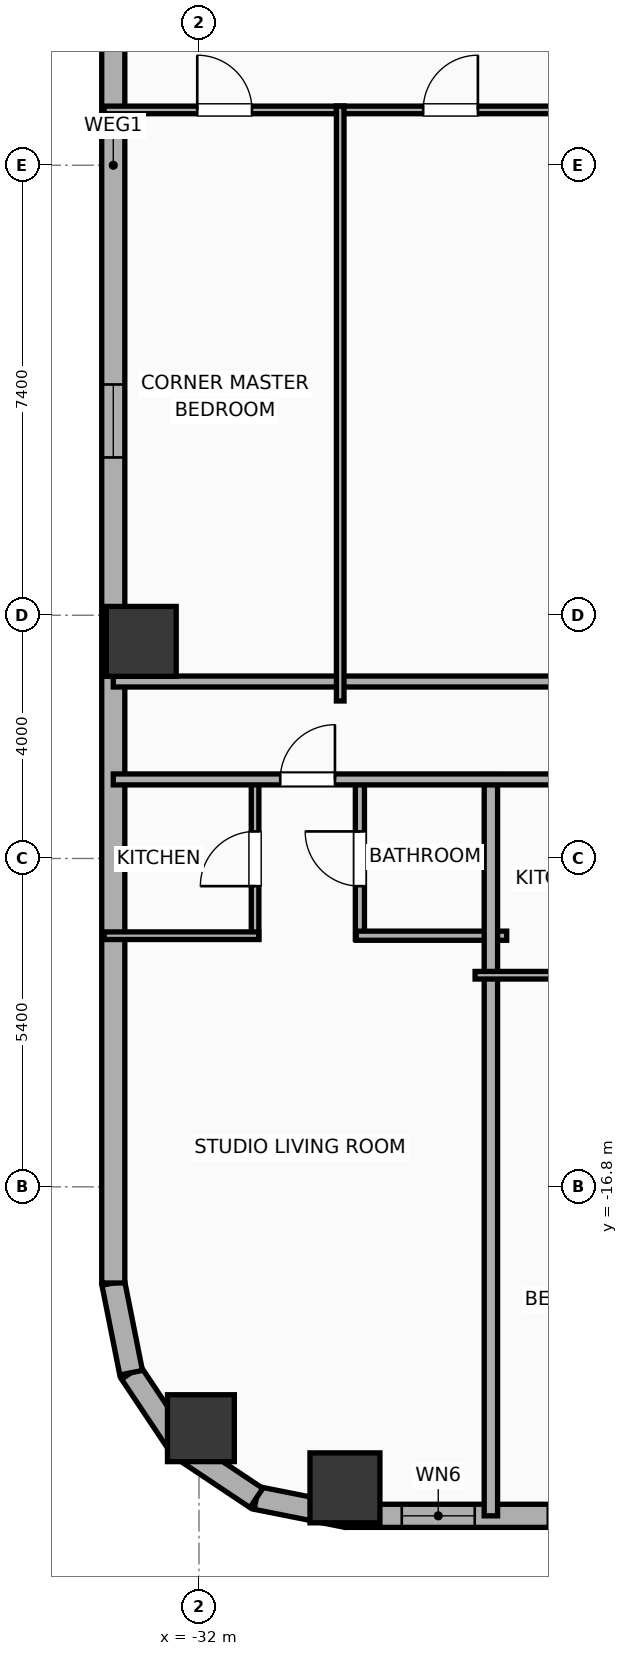
"""IFC4 building model, lengths in metres.
Left out: names, types, materials, properties, quantities, classifications, styles, units other than length and angle.
Written with IfcOpenShell. Run it as: python <this file> out.ifc"""

import sys

from ifc_helpers import new_model, si_unit, direction, frame, frame_2d, origin, origin_2d, place, context, subcontext, project, spatial, rectangle, hollow_rectangle, hollow_circle, extrude, element, fill, save


model = new_model("IFC4")
c1 = context("Model", 3, precision=1e-05, world=origin(), true_north=direction((0.0, 1.0)))
c2 = subcontext(c1, "Body", "Model", "MODEL_VIEW")
j1 = project(units=[si_unit("LENGTHUNIT", "METRE"), si_unit("PLANEANGLEUNIT", "RADIAN")], contexts=[c1])
p1 = place(None, origin())
s1 = spatial("IfcSite", under=j1, at=p1, CompositionType="ELEMENT")
p2 = place(p1, origin())
s2 = spatial("IfcBuilding", under=s1, at=p2, CompositionType="ELEMENT")
p3 = place(p2, frame((0.0, 0.0, 41.6)))
s3 = spatial("IfcBuildingStorey", under=s2, at=p3, CompositionType="ELEMENT", Elevation=41.6)
for number, where, z_axis, x_axis in (
    (1, (-29.6, -21.75, 0.0), (0.0, 0.0, 1.0), (1.0, 0.0, 0.0)),
    (2, (-32.95, -7.83, 0.0), (0.0, 0.0, 1.0), (1.0, 0.0, 0.0)),
):
    element("IfcColumn", number, at=place(p3, frame(where, z_axis=z_axis, x_axis=x_axis)), inside=s3, PredefinedType="COLUMN", context=c2, shape_type="SweptSolid", body=[
        extrude(hollow_rectangle(XDim=1.15, YDim=1.15, WallThickness=0.04, at=origin_2d()), origin(), (0.0, 0.0, 1.0), 3.9),
    ])
p4 = place(p3, frame((-31.969, -20.769, 0.0), z_axis=(0.0, 0.0, 1.0), x_axis=(1.0, 0.0, 0.0)))
e3 = element("IfcColumn", 3, at=p4, inside=s3, PredefinedType="COLUMN", context=c2, shape_type="SweptSolid", body=[
    extrude(hollow_circle(Radius=0.55, WallThickness=0.036, at=origin_2d()), origin(), (0.0, 0.0, 1.0), 3.9),
])
p5 = place(p3, frame((22.381, -22.21, 0.0), z_axis=(0.0, 0.0, 1.0), x_axis=(-1.0, 0.0, 0.0)))
e4 = element("IfcWall", 4, at=p5, inside=s3, PredefinedType="ELEMENTEDWALL", context=c2, shape_type="SweptSolid", body=[
    extrude(rectangle(XDim=51.963, YDim=0.38, at=frame_2d((25.981, 0.0))), origin(), (0.0, 0.0, 1.0), 3.65),
])
p6 = place(p5, frame((42.952, 0.0, 0.75)))
e5 = element("IfcOpeningElement", 5, at=p6, cuts=e4, PredefinedType="OPENING", context=c2, shape_type="SweptSolid", body=[
    extrude(rectangle(XDim=2.4, YDim=2.1, at=frame_2d((1.2, 1.05))), frame((0.0, 0.2, 0.0), z_axis=(0.0, -1.0, 0.0), x_axis=(1.0, 0.0, 0.0)), (0.0, 0.0, 1.0), 0.4),
])
p7 = place(p5, frame((49.847, 0.0, 0.75)))
e6 = element("IfcOpeningElement", 6, at=p7, cuts=e4, PredefinedType="OPENING", context=c2, shape_type="SweptSolid", body=[
    extrude(rectangle(XDim=1.2, YDim=2.05, at=frame_2d((0.6, 1.025))), frame((0.0, 0.2, 0.0), z_axis=(0.0, -1.0, 0.0), x_axis=(1.0, 0.0, 0.0)), (0.0, 0.0, 1.0), 0.4),
])
p8 = place(p5, frame((47.445, 0.0, 0.75)))
e7 = element("IfcOpeningElement", 7, at=p8, cuts=e4, PredefinedType="OPENING", context=c2, shape_type="SweptSolid", body=[
    extrude(rectangle(XDim=1.2, YDim=2.05, at=frame_2d((0.6, 1.025))), frame((0.0, 0.2, 0.0), z_axis=(0.0, -1.0, 0.0), x_axis=(1.0, 0.0, 0.0)), (0.0, 0.0, 1.0), 0.4),
])
p9 = place(p5, frame((39.526, 0.0, 0.75)))
e8 = element("IfcOpeningElement", 8, at=p9, cuts=e4, PredefinedType="OPENING", context=c2, shape_type="SweptSolid", body=[
    extrude(rectangle(XDim=1.2, YDim=2.05, at=frame_2d((0.6, 1.025))), frame((0.0, 0.2, 0.0), z_axis=(0.0, -1.0, 0.0), x_axis=(1.0, 0.0, 0.0)), (0.0, 0.0, 1.0), 0.4),
])
p10 = place(p5, frame((33.018, 0.0, 0.75)))
e9 = element("IfcOpeningElement", 9, at=p10, cuts=e4, PredefinedType="OPENING", context=c2, shape_type="SweptSolid", body=[
    extrude(rectangle(XDim=1.2, YDim=2.05, at=frame_2d((0.6, 1.025))), frame((0.0, 0.2, 0.0), z_axis=(0.0, -1.0, 0.0), x_axis=(1.0, 0.0, 0.0)), (0.0, 0.0, 1.0), 0.4),
])
p11 = place(p5, frame((36.813, 0.0, 0.75)))
e10 = element("IfcOpeningElement", 10, at=p11, cuts=e4, PredefinedType="OPENING", context=c2, shape_type="SweptSolid", body=[
    extrude(rectangle(XDim=1.2, YDim=2.05, at=frame_2d((0.6, 1.025))), frame((0.0, 0.2, 0.0), z_axis=(0.0, -1.0, 0.0), x_axis=(1.0, 0.0, 0.0)), (0.0, 0.0, 1.0), 0.4),
])
p12 = place(p5, frame((28.886, 0.0, 0.75)))
e11 = element("IfcOpeningElement", 11, at=p12, cuts=e4, PredefinedType="OPENING", context=c2, shape_type="SweptSolid", body=[
    extrude(rectangle(XDim=1.2, YDim=2.05, at=frame_2d((0.6, 1.025))), frame((0.0, 0.2, 0.0), z_axis=(0.0, -1.0, 0.0), x_axis=(1.0, 0.0, 0.0)), (0.0, 0.0, 1.0), 0.4),
])
p13 = place(p5, frame((23.306, 0.0, 0.75)))
e12 = element("IfcOpeningElement", 12, at=p13, cuts=e4, PredefinedType="OPENING", context=c2, shape_type="SweptSolid", body=[
    extrude(rectangle(XDim=1.2, YDim=2.05, at=frame_2d((0.6, 1.025))), frame((0.0, 0.2, 0.0), z_axis=(0.0, -1.0, 0.0), x_axis=(1.0, 0.0, 0.0)), (0.0, 0.0, 1.0), 0.4),
])
p14 = place(p5, frame((26.056, 0.0, 0.75)))
e13 = element("IfcOpeningElement", 13, at=p14, cuts=e4, PredefinedType="OPENING", context=c2, shape_type="SweptSolid", body=[
    extrude(rectangle(XDim=1.2, YDim=2.05, at=frame_2d((0.6, 1.025))), frame((0.0, 0.2, 0.0), z_axis=(0.0, -1.0, 0.0), x_axis=(1.0, 0.0, 0.0)), (0.0, 0.0, 1.0), 0.4),
])
p15 = place(p5, frame((18.811, 0.0, 0.75)))
e14 = element("IfcOpeningElement", 14, at=p15, cuts=e4, PredefinedType="OPENING", context=c2, shape_type="SweptSolid", body=[
    extrude(rectangle(XDim=1.2, YDim=2.05, at=frame_2d((0.6, 1.025))), frame((0.0, 0.2, 0.0), z_axis=(0.0, -1.0, 0.0), x_axis=(1.0, 0.0, 0.0)), (0.0, 0.0, 1.0), 0.4),
])
p16 = place(p5, frame((14.602, 0.0, 0.75)))
e15 = element("IfcOpeningElement", 15, at=p16, cuts=e4, PredefinedType="OPENING", context=c2, shape_type="SweptSolid", body=[
    extrude(rectangle(XDim=1.2, YDim=2.05, at=frame_2d((0.6, 1.025))), frame((0.0, 0.2, 0.0), z_axis=(0.0, -1.0, 0.0), x_axis=(1.0, 0.0, 0.0)), (0.0, 0.0, 1.0), 0.4),
])
p17 = place(p5, frame((11.852, 0.0, 0.75)))
e16 = element("IfcOpeningElement", 16, at=p17, cuts=e4, PredefinedType="OPENING", context=c2, shape_type="SweptSolid", body=[
    extrude(rectangle(XDim=1.2, YDim=2.05, at=frame_2d((0.6, 1.025))), frame((0.0, 0.2, 0.0), z_axis=(0.0, -1.0, 0.0), x_axis=(1.0, 0.0, 0.0)), (0.0, 0.0, 1.0), 0.4),
])
p18 = place(p5, frame((8.316, 0.0, 0.75)))
e17 = element("IfcOpeningElement", 17, at=p18, cuts=e4, PredefinedType="OPENING", context=c2, shape_type="SweptSolid", body=[
    extrude(rectangle(XDim=1.2, YDim=2.05, at=frame_2d((0.6, 1.025))), frame((0.0, 0.2, 0.0), z_axis=(0.0, -1.0, 0.0), x_axis=(1.0, 0.0, 0.0)), (0.0, 0.0, 1.0), 0.4),
])
p19 = place(p5, frame((6.286, 0.0, 0.75)))
e18 = element("IfcOpeningElement", 18, at=p19, cuts=e4, PredefinedType="OPENING", context=c2, shape_type="SweptSolid", body=[
    extrude(rectangle(XDim=1.2, YDim=2.05, at=frame_2d((0.6, 1.025))), frame((0.0, 0.2, 0.0), z_axis=(0.0, -1.0, 0.0), x_axis=(1.0, 0.0, 0.0)), (0.0, 0.0, 1.0), 0.4),
])
p20 = place(p5, frame((3.737, 0.0, 0.75)))
e19 = element("IfcOpeningElement", 19, at=p20, cuts=e4, PredefinedType="OPENING", context=c2, shape_type="SweptSolid", body=[
    extrude(rectangle(XDim=1.2, YDim=2.05, at=frame_2d((0.6, 1.025))), frame((0.0, 0.2, 0.0), z_axis=(0.0, -1.0, 0.0), x_axis=(1.0, 0.0, 0.0)), (0.0, 0.0, 1.0), 0.4),
])
p21 = place(p5, frame((1.291, 0.0, 0.75)))
e20 = element("IfcOpeningElement", 20, at=p21, cuts=e4, PredefinedType="OPENING", context=c2, shape_type="SweptSolid", body=[
    extrude(rectangle(XDim=1.2, YDim=2.05, at=frame_2d((0.6, 1.025))), frame((0.0, 0.2, 0.0), z_axis=(0.0, -1.0, 0.0), x_axis=(1.0, 0.0, 0.0)), (0.0, 0.0, 1.0), 0.4),
])
p22 = place(p3, frame((-29.581, -22.21, 0.0), z_axis=(0.0, 0.0, 1.0), x_axis=(-0.980786132421, 0.195086038585, 0.0)))
e21 = element("IfcWall", 21, at=p22, inside=s3, PredefinedType="ELEMENTEDWALL", context=c2, shape_type="SweptSolid", body=[
    extrude(rectangle(XDim=1.504, YDim=0.38, at=frame_2d((0.752, 0.0))), origin(), (0.0, 0.0, 1.0), 3.65),
])
p23 = place(p3, frame((-31.057, -21.917, 0.0), z_axis=(0.0, 0.0, 1.0), x_axis=(-0.831442848281, 0.555610286119, 0.0)))
e22 = element("IfcWall", 22, at=p23, inside=s3, PredefinedType="ELEMENTEDWALL", context=c2, shape_type="SweptSolid", body=[
    extrude(rectangle(XDim=1.485, YDim=0.38, at=frame_2d((0.743, 0.0))), origin(), (0.0, 0.0, 1.0), 3.65),
])
p24 = place(p3, frame((-32.292, -21.091, 0.0), z_axis=(0.0, 0.0, 1.0), x_axis=(-0.555572577804, 0.831468045563, 0.0)))
e23 = element("IfcWall", 23, at=p24, inside=s3, PredefinedType="ELEMENTEDWALL", context=c2, shape_type="SweptSolid", body=[
    extrude(rectangle(XDim=1.485, YDim=0.38, at=frame_2d((0.742, 0.0))), origin(), (0.0, 0.0, 1.0), 3.65),
])
p25 = place(p3, frame((-33.116, -19.857, 0.0), z_axis=(0.0, 0.0, 1.0), x_axis=(-0.195086038585, 0.980786132421, 0.0)))
e24 = element("IfcWall", 24, at=p25, inside=s3, PredefinedType="ELEMENTEDWALL", context=c2, shape_type="SweptSolid", body=[
    extrude(rectangle(XDim=1.504, YDim=0.38, at=frame_2d((0.752, 0.0))), origin(), (0.0, 0.0, 1.0), 3.65),
])
p26 = place(p3, frame((-33.41, -18.381, 0.0), z_axis=(0.0, 0.0, 1.0), x_axis=(0.0, 1.0, 0.0)))
e25 = element("IfcWall", 25, at=p26, inside=s3, PredefinedType="ELEMENTEDWALL", context=c2, shape_type="SweptSolid", body=[
    extrude(rectangle(XDim=36.763, YDim=0.38, at=frame_2d((18.381, 0.0))), origin(), (0.0, 0.0, 1.0), 3.65),
])
p27 = place(p26, frame((33.187, 0.0, 0.75)))
e26 = element("IfcOpeningElement", 26, at=p27, cuts=e25, PredefinedType="OPENING", context=c2, shape_type="SweptSolid", body=[
    extrude(rectangle(XDim=1.2, YDim=2.05, at=frame_2d((0.6, 1.025))), frame((0.0, 0.2, 0.0), z_axis=(0.0, -1.0, 0.0), x_axis=(1.0, 0.0, 0.0)), (0.0, 0.0, 1.0), 0.4),
])
p28 = place(p26, frame((22.126, 0.0, 0.75)))
e27 = element("IfcOpeningElement", 27, at=p28, cuts=e25, PredefinedType="OPENING", context=c2, shape_type="SweptSolid", body=[
    extrude(rectangle(XDim=1.2, YDim=2.05, at=frame_2d((0.6, 1.025))), frame((0.0, 0.2, 0.0), z_axis=(0.0, -1.0, 0.0), x_axis=(1.0, 0.0, 0.0)), (0.0, 0.0, 1.0), 0.4),
])
p29 = place(p26, frame((13.576, 0.0, 0.75)))
e28 = element("IfcOpeningElement", 28, at=p29, cuts=e25, PredefinedType="OPENING", context=c2, shape_type="SweptSolid", body=[
    extrude(rectangle(XDim=1.2, YDim=2.05, at=frame_2d((0.6, 1.025))), frame((0.0, 0.2, 0.0), z_axis=(0.0, -1.0, 0.0), x_axis=(1.0, 0.0, 0.0)), (0.0, 0.0, 1.0), 0.4),
])
p30 = place(p3, frame((-33.41, -8.49, 0.0), z_axis=(0.0, 0.0, 1.0), x_axis=(1.0, 0.0, 0.0)))
e29 = element("IfcWall", 29, at=p30, inside=s3, PredefinedType="PARTITIONING", context=c2, shape_type="SweptSolid", body=[
    extrude(rectangle(XDim=23.53, YDim=0.18, at=frame_2d((11.765, 0.0))), origin(), (0.0, 0.0, 1.0), 3.65),
])
p31 = place(p3, frame((-31.078, -12.73, 0.0), z_axis=(0.0, 0.0, 1.0), x_axis=(0.0, 1.0, 0.0)))
e30 = element("IfcWall", 30, at=p31, inside=s3, PredefinedType="PARTITIONING", context=c2, shape_type="SweptSolid", body=[
    extrude(rectangle(XDim=2.65, YDim=0.125, at=frame_2d((1.325, 0.0))), origin(), (0.0, 0.0, 1.0), 3.65),
])
p32 = place(p31, frame((0.875, 0.0, 0.0)))
e31 = element("IfcOpeningElement", 31, at=p32, cuts=e30, PredefinedType="OPENING", context=c2, shape_type="SweptSolid", body=[
    extrude(rectangle(XDim=0.9, YDim=2.05, at=frame_2d((0.45, 1.025))), frame((0.0, 0.073, 0.0), z_axis=(0.0, -1.0, 0.0), x_axis=(1.0, 0.0, 0.0)), (0.0, 0.0, 1.0), 0.145),
])
p33 = place(p3, frame((-29.354, -12.73, 0.0), z_axis=(0.0, 0.0, 1.0), x_axis=(0.0, 1.0, 0.0)))
e32 = element("IfcWall", 32, at=p33, inside=s3, PredefinedType="PLUMBINGWALL", context=c2, shape_type="SweptSolid", body=[
    extrude(rectangle(XDim=2.65, YDim=0.15, at=frame_2d((1.325, 0.0))), origin(), (0.0, 0.0, 1.0), 3.65),
])
p34 = place(p33, frame((0.875, 0.0, 0.0)))
e33 = element("IfcOpeningElement", 33, at=p34, cuts=e32, PredefinedType="OPENING", context=c2, shape_type="SweptSolid", body=[
    extrude(rectangle(XDim=0.9, YDim=2.05, at=frame_2d((0.45, 1.025))), frame((0.0, 0.085, 0.0), z_axis=(0.0, -1.0, 0.0), x_axis=(1.0, 0.0, 0.0)), (0.0, 0.0, 1.0), 0.17),
])
p35 = place(p3, frame((-33.56, -12.67, 0.0), z_axis=(0.0, 0.0, 1.0), x_axis=(1.0, 0.0, 0.0)))
e34 = element("IfcWall", 34, at=p35, inside=s3, PredefinedType="PARTITIONING", context=c2, shape_type="SweptSolid", body=[
    extrude(rectangle(XDim=2.542, YDim=0.125, at=frame_2d((1.271, 0.0))), origin(), (0.0, 0.0, 1.0), 3.65),
])
p36 = place(p3, frame((-29.414, -12.67, 0.0), z_axis=(0.0, 0.0, 1.0), x_axis=(1.0, 0.0, 0.0)))
e35 = element("IfcWall", 35, at=p36, inside=s3, PredefinedType="PLUMBINGWALL", context=c2, shape_type="SweptSolid", body=[
    extrude(rectangle(XDim=2.474, YDim=0.15, at=frame_2d((1.237, 0.0))), origin(), (0.0, 0.0, 1.0), 3.65),
])
p37 = place(p3, frame((-27.2, -22.21, 0.0), z_axis=(0.0, 0.0, 1.0), x_axis=(0.0, 1.0, 0.0)))
e36 = element("IfcWall", 36, at=p37, inside=s3, PredefinedType="PARTITIONING", context=c2, shape_type="SweptSolid", body=[
    extrude(rectangle(XDim=12.19, YDim=0.22, at=frame_2d((6.095, 0.0))), origin(), (0.0, 0.0, 1.0), 3.65),
])
p38 = place(p3, frame((-27.46, -13.32, 0.0), z_axis=(0.0, 0.0, 1.0), x_axis=(1.0, 0.0, 0.0)))
e37 = element("IfcWall", 37, at=p38, inside=s3, PredefinedType="PARTITIONING", context=c2, shape_type="SweptSolid", body=[
    extrude(rectangle(XDim=3.452, YDim=0.125, at=frame_2d((1.726, 0.0))), origin(), (0.0, 0.0, 1.0), 3.65),
])
p39 = place(p3, frame((-33.41, -10.1, 0.0), z_axis=(0.0, 0.0, 1.0), x_axis=(1.0, 0.0, 0.0)))
e38 = element("IfcWall", 38, at=p39, inside=s3, PredefinedType="PARTITIONING", context=c2, shape_type="SweptSolid", body=[
    extrude(rectangle(XDim=59.62, YDim=0.18, at=frame_2d((29.81, 0.0))), origin(), (0.0, 0.0, 1.0), 3.65),
])
p40 = place(p39, frame((2.746, 0.0, 0.0)))
e39 = element("IfcOpeningElement", 39, at=p40, cuts=e38, PredefinedType="OPENING", context=c2, shape_type="SweptSolid", body=[
    extrude(rectangle(XDim=0.9, YDim=2.05, at=frame_2d((0.45, 1.025))), frame((0.0, 0.1, 0.0), z_axis=(0.0, -1.0, 0.0), x_axis=(1.0, 0.0, 0.0)), (0.0, 0.0, 1.0), 0.2),
])
p41 = place(p39, frame((11.552, 0.0, 0.0)))
e40 = element("IfcOpeningElement", 40, at=p41, cuts=e38, PredefinedType="OPENING", context=c2, shape_type="SweptSolid", body=[
    extrude(rectangle(XDim=1.15, YDim=2.05, at=frame_2d((0.575, 1.025))), frame((0.0, 0.1, 0.0), z_axis=(0.0, -1.0, 0.0), x_axis=(1.0, 0.0, 0.0)), (0.0, 0.0, 1.0), 0.2),
])
p42 = place(p39, frame((22.379, 0.0, 0.0)))
e41 = element("IfcOpeningElement", 41, at=p42, cuts=e38, PredefinedType="OPENING", context=c2, shape_type="SweptSolid", body=[
    extrude(rectangle(XDim=1.15, YDim=2.05, at=frame_2d((0.575, 1.025))), frame((0.0, 0.1, 0.0), z_axis=(0.0, -1.0, 0.0), x_axis=(1.0, 0.0, 0.0)), (0.0, 0.0, 1.0), 0.2),
])
p43 = place(p39, frame((31.28, 0.0, 0.0)))
e42 = element("IfcOpeningElement", 42, at=p43, cuts=e38, PredefinedType="OPENING", context=c2, shape_type="SweptSolid", body=[
    extrude(rectangle(XDim=1.15, YDim=2.05, at=frame_2d((0.575, 1.025))), frame((0.0, 0.1, 0.0), z_axis=(0.0, -1.0, 0.0), x_axis=(1.0, 0.0, 0.0)), (0.0, 0.0, 1.0), 0.2),
])
p44 = place(p39, frame((36.02, 0.0, 0.0)))
e43 = element("IfcOpeningElement", 43, at=p44, cuts=e38, PredefinedType="OPENING", context=c2, shape_type="SweptSolid", body=[
    extrude(rectangle(XDim=0.9, YDim=2.05, at=frame_2d((0.45, 1.025))), frame((0.0, 0.1, 0.0), z_axis=(0.0, -1.0, 0.0), x_axis=(1.0, 0.0, 0.0)), (0.0, 0.0, 1.0), 0.2),
])
p45 = place(p39, frame((40.044, 0.0, 0.0)))
e44 = element("IfcOpeningElement", 44, at=p45, cuts=e38, PredefinedType="OPENING", context=c2, shape_type="SweptSolid", body=[
    extrude(rectangle(XDim=1.15, YDim=2.05, at=frame_2d((0.575, 1.025))), frame((0.0, 0.1, 0.0), z_axis=(0.0, -1.0, 0.0), x_axis=(1.0, 0.0, 0.0)), (0.0, 0.0, 1.0), 0.2),
])
p46 = place(p39, frame((45.613, 0.0, 0.0)))
e45 = element("IfcOpeningElement", 45, at=p46, cuts=e38, PredefinedType="OPENING", context=c2, shape_type="SweptSolid", body=[
    extrude(rectangle(XDim=1.15, YDim=2.05, at=frame_2d((0.575, 1.025))), frame((0.0, 0.1, 0.0), z_axis=(0.0, -1.0, 0.0), x_axis=(1.0, 0.0, 0.0)), (0.0, 0.0, 1.0), 0.2),
])
p47 = place(p39, frame((54.174, 0.0, 0.0)))
e46 = element("IfcOpeningElement", 46, at=p47, cuts=e38, PredefinedType="OPENING", context=c2, shape_type="SweptSolid", body=[
    extrude(rectangle(XDim=1.15, YDim=2.05, at=frame_2d((0.575, 1.025))), frame((0.0, 0.1, 0.0), z_axis=(0.0, -1.0, 0.0), x_axis=(1.0, 0.0, 0.0)), (0.0, 0.0, 1.0), 0.2),
])
p48 = place(p3, frame((-33.56, 0.91, 0.0), z_axis=(0.0, 0.0, 1.0), x_axis=(1.0, 0.0, 0.0)))
e47 = element("IfcWall", 47, at=p48, inside=s3, PredefinedType="PARTITIONING", context=c2, shape_type="SweptSolid", body=[
    extrude(rectangle(XDim=3.945, YDim=0.125, at=frame_2d((1.972, 0.0))), origin(), (0.0, 0.0, 1.0), 3.65),
])
p49 = place(p48, frame((1.531, 0.0, 0.0)))
e48 = element("IfcOpeningElement", 48, at=p49, cuts=e47, PredefinedType="OPENING", context=c2, shape_type="SweptSolid", body=[
    extrude(rectangle(XDim=0.9, YDim=2.05, at=frame_2d((0.45, 1.025))), frame((0.0, 0.073, 0.0), z_axis=(0.0, -1.0, 0.0), x_axis=(1.0, 0.0, 0.0)), (0.0, 0.0, 1.0), 0.145),
])
p50 = place(p3, frame((-29.74, 0.91, 0.0), z_axis=(0.0, 0.0, 1.0), x_axis=(1.0, 0.0, 0.0)))
e49 = element("IfcWall", 49, at=p50, inside=s3, PredefinedType="PARTITIONING", context=c2, shape_type="SweptSolid", body=[
    extrude(rectangle(XDim=3.754, YDim=0.125, at=frame_2d((1.877, 0.0))), origin(), (0.0, 0.0, 1.0), 3.65),
])
p51 = place(p50, frame((1.427, 0.0, 0.0)))
e50 = element("IfcOpeningElement", 50, at=p51, cuts=e49, PredefinedType="OPENING", context=c2, shape_type="SweptSolid", body=[
    extrude(rectangle(XDim=0.9, YDim=2.05, at=frame_2d((0.45, 1.025))), frame((0.0, 0.073, 0.0), z_axis=(0.0, -1.0, 0.0), x_axis=(1.0, 0.0, 0.0)), (0.0, 0.0, 1.0), 0.145),
])
p52 = place(p3, frame((-29.678, -8.81, 0.0), z_axis=(0.0, 0.0, 1.0), x_axis=(0.0, 1.0, 0.0)))
e51 = element("IfcWall", 51, at=p52, inside=s3, PredefinedType="PARTITIONING", context=c2, shape_type="SweptSolid", body=[
    extrude(rectangle(XDim=9.78, YDim=0.125, at=frame_2d((4.89, 0.0))), origin(), (0.0, 0.0, 1.0), 3.65),
])
p53 = place(p7, origin())
e52 = element("IfcWindow", 52, at=p53, inside=s3, PartitioningType="SINGLE_PANEL", PredefinedType="WINDOW", context=c2, shape_type="SweptSolid", body=[
    extrude(rectangle(XDim=1.2, YDim=2.05, at=frame_2d((0.6, 1.025))), frame((0.0, 0.03, 0.0), z_axis=(0.0, -1.0, 0.0), x_axis=(1.0, 0.0, 0.0)), (0.0, 0.0, 1.0), 0.06),
])
fill(e6, e52)
p54 = place(p8, origin())
e53 = element("IfcWindow", 53, at=p54, inside=s3, PartitioningType="SINGLE_PANEL", PredefinedType="WINDOW", context=c2, shape_type="SweptSolid", body=[
    extrude(rectangle(XDim=1.2, YDim=2.05, at=frame_2d((0.6, 1.025))), frame((0.0, 0.03, 0.0), z_axis=(0.0, -1.0, 0.0), x_axis=(1.0, 0.0, 0.0)), (0.0, 0.0, 1.0), 0.06),
])
fill(e7, e53)
p55 = place(p29, origin())
e54 = element("IfcWindow", 54, at=p55, inside=s3, PartitioningType="SINGLE_PANEL", PredefinedType="WINDOW", context=c2, shape_type="SweptSolid", body=[
    extrude(rectangle(XDim=1.2, YDim=2.05, at=frame_2d((0.6, 1.025))), frame((0.0, 0.03, 0.0), z_axis=(0.0, -1.0, 0.0), x_axis=(1.0, 0.0, 0.0)), (0.0, 0.0, 1.0), 0.06),
])
fill(e28, e54)
p56 = place(p32, origin())
e55 = element("IfcDoor", 55, at=p56, inside=s3, OperationType="SINGLE_SWING_LEFT", PredefinedType="DOOR", context=c2, shape_type="SweptSolid", body=[
    extrude(rectangle(XDim=0.9, YDim=2.05, at=frame_2d((0.45, 1.025))), frame((0.0, 0.025, 0.0), z_axis=(0.0, -1.0, 0.0), x_axis=(1.0, 0.0, 0.0)), (0.0, 0.0, 1.0), 0.05),
])
fill(e31, e55)
p57 = place(p34, origin())
e56 = element("IfcDoor", 56, at=p57, inside=s3, OperationType="SINGLE_SWING_RIGHT", PredefinedType="DOOR", context=c2, shape_type="SweptSolid", body=[
    extrude(rectangle(XDim=0.9, YDim=2.05, at=frame_2d((0.45, 1.025))), frame((0.0, 0.025, 0.0), z_axis=(0.0, -1.0, 0.0), x_axis=(1.0, 0.0, 0.0)), (0.0, 0.0, 1.0), 0.05),
])
fill(e33, e56)
p58 = place(p40, origin())
e57 = element("IfcDoor", 57, at=p58, inside=s3, OperationType="SINGLE_SWING_RIGHT", PredefinedType="DOOR", context=c2, shape_type="SweptSolid", body=[
    extrude(rectangle(XDim=0.9, YDim=2.05, at=frame_2d((0.45, 1.025))), frame((0.0, 0.025, 0.0), z_axis=(0.0, -1.0, 0.0), x_axis=(1.0, 0.0, 0.0)), (0.0, 0.0, 1.0), 0.05),
])
fill(e39, e57)
p59 = place(p49, origin())
e58 = element("IfcDoor", 58, at=p59, inside=s3, OperationType="SINGLE_SWING_LEFT", PredefinedType="DOOR", context=c2, shape_type="SweptSolid", body=[
    extrude(rectangle(XDim=0.9, YDim=2.05, at=frame_2d((0.45, 1.025))), frame((0.0, 0.025, 0.0), z_axis=(0.0, -1.0, 0.0), x_axis=(1.0, 0.0, 0.0)), (0.0, 0.0, 1.0), 0.05),
])
fill(e48, e58)
p60 = place(p51, origin())
e59 = element("IfcDoor", 59, at=p60, inside=s3, OperationType="SINGLE_SWING_RIGHT", PredefinedType="DOOR", context=c2, shape_type="SweptSolid", body=[
    extrude(rectangle(XDim=0.9, YDim=2.05, at=frame_2d((0.45, 1.025))), frame((0.0, 0.025, 0.0), z_axis=(0.0, -1.0, 0.0), x_axis=(1.0, 0.0, 0.0)), (0.0, 0.0, 1.0), 0.05),
])
fill(e50, e59)
save(model, sys.argv[1])
